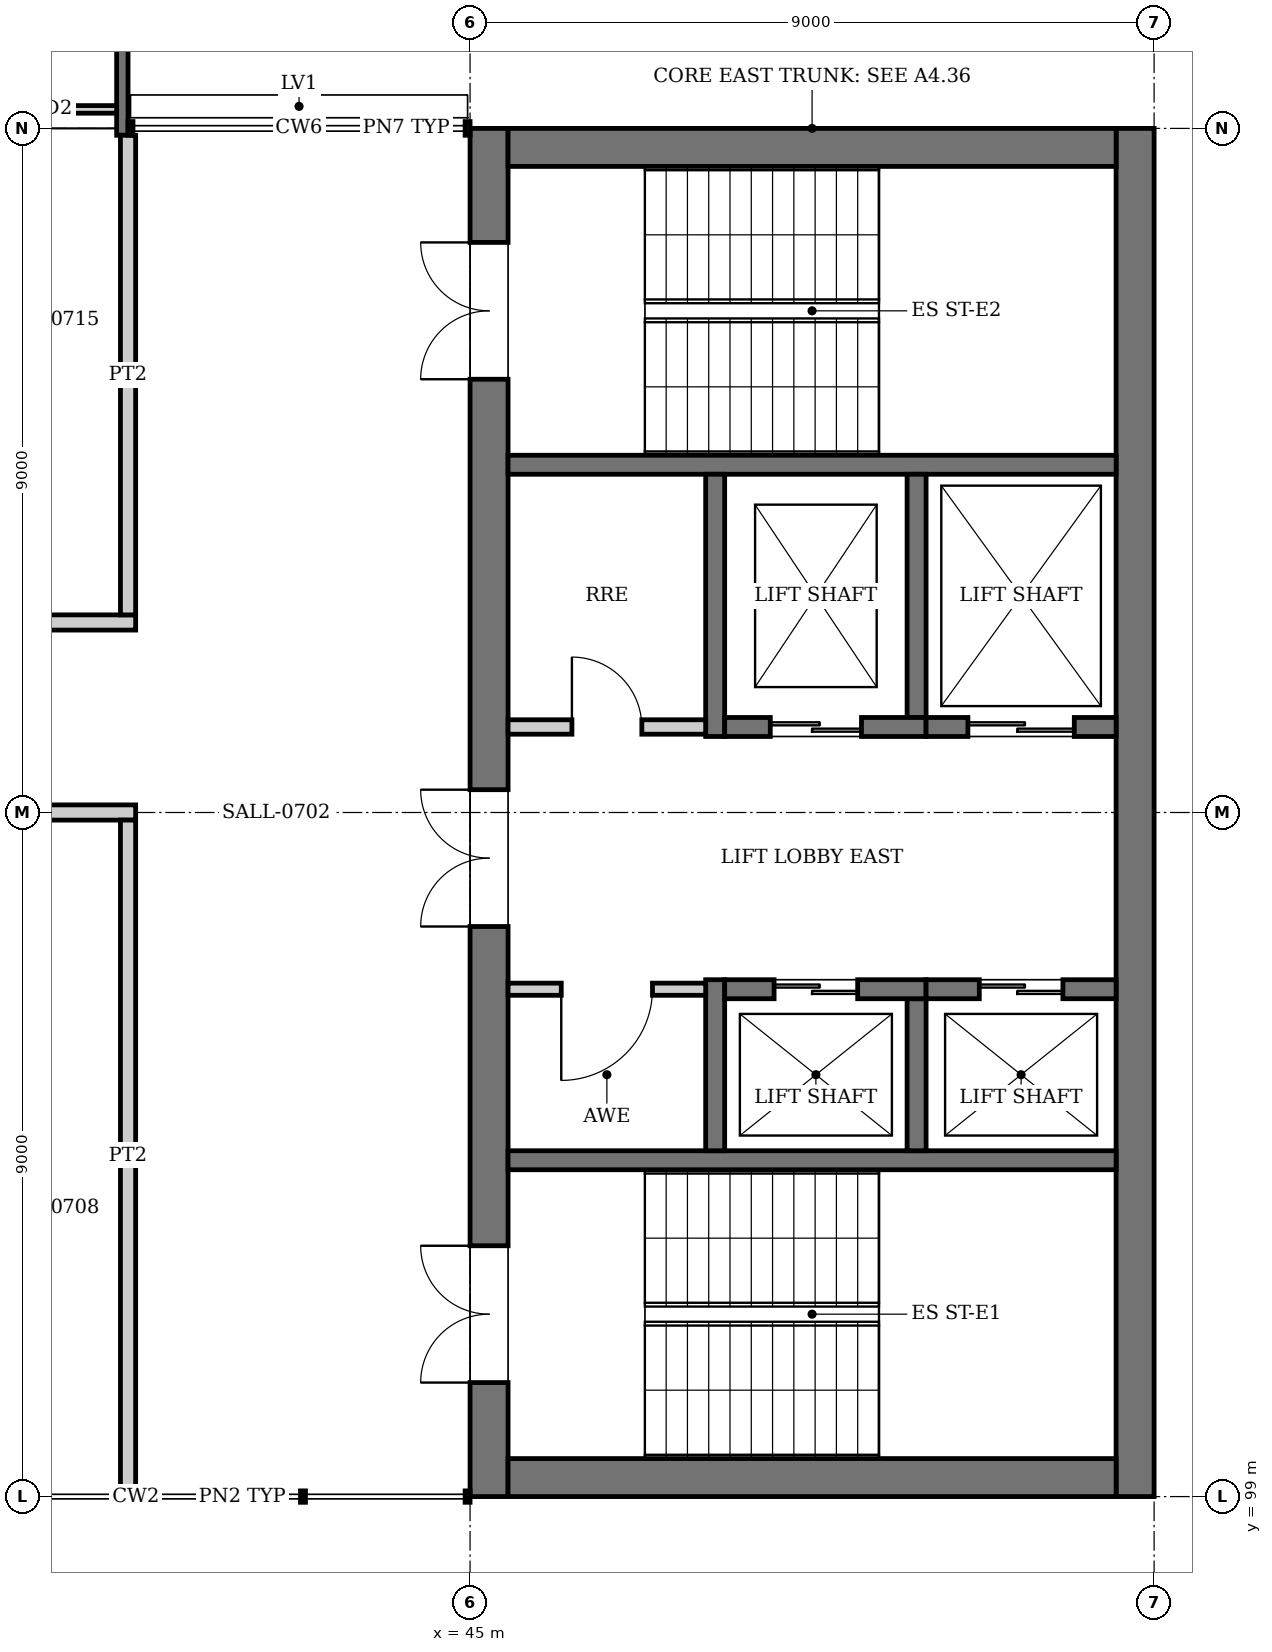
"""IFC4 building model, lengths in metres.
Left out: names, types, materials, properties, quantities, classifications, styles, units other than length and angle.
Written with IfcOpenShell. Run it as: python <this file> out.ifc"""

import sys

from ifc_helpers import new_model, si_unit, direction, frame, frame_2d, origin, place, context, subcontext, project, spatial, rectangle, extrude, element, fill, save


model = new_model("IFC4")
c1 = context("Model", 3, precision=1e-05, world=origin(), true_north=direction((0.0, 1.0)))
c2 = subcontext(c1, "Body", "Model", "MODEL_VIEW")
j1 = project(units=[si_unit("LENGTHUNIT", "METRE"), si_unit("PLANEANGLEUNIT", "RADIAN")], contexts=[c1])
p1 = place(None, origin())
s1 = spatial("IfcSite", under=j1, at=p1, CompositionType="ELEMENT")
p2 = place(p1, origin())
s2 = spatial("IfcBuilding", under=s1, at=p2, CompositionType="ELEMENT")
p3 = place(p2, frame((0.0, 0.0, 31.2)))
s3 = spatial("IfcBuildingStorey", under=s2, at=p3, CompositionType="ELEMENT", Elevation=31.2)
p4 = place(p3, frame((45.25, 99.0, 0.0), z_axis=(0.0, 0.0, 1.0), x_axis=(0.0, 1.0, 0.0)))
e1 = element("IfcWall", 1, at=p4, inside=s3, PredefinedType="SHEAR", context=c2, shape_type="SweptSolid", body=[
    extrude(rectangle(XDim=18.0, YDim=0.5, at=frame_2d((9.0, 0.0))), origin(), (0.0, 0.0, 1.0), 4.0),
])
p5 = place(p4, frame((1.5, 0.0, 0.0)))
e2 = element("IfcOpeningElement", 2, at=p5, cuts=e1, PredefinedType="OPENING", context=c2, shape_type="SweptSolid", body=[
    extrude(rectangle(XDim=1.8, YDim=2.1, at=frame_2d((0.9, 1.05))), frame((0.0, 0.26, 0.0), z_axis=(0.0, -1.0, 0.0), x_axis=(1.0, 0.0, 0.0)), (0.0, 0.0, 1.0), 0.52),
])
p6 = place(p4, frame((14.7, 0.0, 0.0)))
e3 = element("IfcOpeningElement", 3, at=p6, cuts=e1, PredefinedType="OPENING", context=c2, shape_type="SweptSolid", body=[
    extrude(rectangle(XDim=1.8, YDim=2.1, at=frame_2d((0.9, 1.05))), frame((0.0, 0.26, 0.0), z_axis=(0.0, -1.0, 0.0), x_axis=(1.0, 0.0, 0.0)), (0.0, 0.0, 1.0), 0.52),
])
p7 = place(p4, frame((7.5, 0.0, 0.0)))
e4 = element("IfcOpeningElement", 4, at=p7, cuts=e1, PredefinedType="OPENING", context=c2, shape_type="SweptSolid", body=[
    extrude(rectangle(XDim=1.8, YDim=2.1, at=frame_2d((0.9, 1.05))), frame((0.0, 0.26, 0.0), z_axis=(0.0, -1.0, 0.0), x_axis=(1.0, 0.0, 0.0)), (0.0, 0.0, 1.0), 0.52),
])
p8 = place(p3, frame((53.75, 99.0, 0.0), z_axis=(0.0, 0.0, 1.0), x_axis=(0.0, 1.0, 0.0)))
e5 = element("IfcWall", 5, at=p8, inside=s3, PredefinedType="SHEAR", context=c2, shape_type="SweptSolid", body=[
    extrude(rectangle(XDim=18.0, YDim=0.5, at=frame_2d((9.0, 0.0))), origin(), (0.0, 0.0, 1.0), 4.0),
])
for number, where, z_axis, x_axis in (
    (6, (45.5, 99.25, 0.0), (0.0, 0.0, 1.0), (1.0, 0.0, 0.0)),
    (7, (45.5, 116.75, 0.0), (0.0, 0.0, 1.0), (1.0, 0.0, 0.0)),
):
    element("IfcWall", number, at=place(p3, frame(where, z_axis=z_axis, x_axis=x_axis)), inside=s3, PredefinedType="SHEAR", context=c2, shape_type="SweptSolid", body=[
        extrude(rectangle(XDim=8.0, YDim=0.5, at=frame_2d((4.0, 0.0))), origin(), (0.0, 0.0, 1.0), 4.0),
    ])
p9 = place(p3, frame((40.425, 120.45, -0.15), z_axis=(0.0, 0.0, 1.0), x_axis=(0.0, -1.0, 0.0)))
e8 = element("IfcWall", 8, at=p9, inside=s3, PredefinedType="SOLIDWALL", context=c2, shape_type="SweptSolid", body=[
    extrude(rectangle(XDim=3.54, YDim=0.15, at=frame_2d((1.77, 0.0))), origin(), (0.0, 0.0, 1.0), 2.75),
])
p10 = place(p3, frame((36.15, 117.25, 0.0), z_axis=(0.0, 0.0, 1.0), x_axis=(1.0, 0.0, 0.0)))
e9 = element("IfcWall", 9, at=p10, inside=s3, PredefinedType="PARTITIONING", context=c2, shape_type="SweptSolid", body=[
    extrude(rectangle(XDim=4.2, YDim=0.1, at=frame_2d((2.1, 0.0))), origin(), (0.0, 0.0, 1.0), 2.6),
])
p11 = place(p10, frame((1.6, 0.0, 0.0)))
e10 = element("IfcOpeningElement", 10, at=p11, cuts=e9, PredefinedType="OPENING", context=c2, shape_type="SweptSolid", body=[
    extrude(rectangle(XDim=0.9, YDim=2.1, at=frame_2d((0.45, 1.05))), frame((0.0, 0.06, 0.0), z_axis=(0.0, -1.0, 0.0), x_axis=(1.0, 0.0, 0.0)), (0.0, 0.0, 1.0), 0.12),
])
for number, where, z_axis, x_axis in (
    (11, (45.5, 103.425, 0.0), (0.0, 0.0, 1.0), (1.0, 0.0, 0.0)),
    (12, (45.5, 112.575, 0.0), (0.0, 0.0, 1.0), (1.0, 0.0, 0.0)),
):
    element("IfcWall", number, at=place(p3, frame(where, z_axis=z_axis, x_axis=x_axis)), inside=s3, PredefinedType="SOLIDWALL", context=c2, shape_type="SweptSolid", body=[
        extrude(rectangle(XDim=8.0, YDim=0.25, at=frame_2d((4.0, 0.0))), origin(), (0.0, 0.0, 1.0), 3.75),
    ])
p12 = place(p3, frame((48.225, 103.55, 0.0), z_axis=(0.0, 0.0, 1.0), x_axis=(0.0, 1.0, 0.0)))
e13 = element("IfcWall", 13, at=p12, inside=s3, PredefinedType="SOLIDWALL", context=c2, shape_type="SweptSolid", body=[
    extrude(rectangle(XDim=2.25, YDim=0.25, at=frame_2d((1.125, 0.0))), origin(), (0.0, 0.0, 1.0), 4.0),
])
p13 = place(p3, frame((50.875, 103.55, 0.0), z_axis=(0.0, 0.0, 1.0), x_axis=(0.0, 1.0, 0.0)))
e14 = element("IfcWall", 14, at=p13, inside=s3, PredefinedType="SOLIDWALL", context=c2, shape_type="SweptSolid", body=[
    extrude(rectangle(XDim=2.0, YDim=0.25, at=frame_2d((1.0, 0.0))), origin(), (0.0, 0.0, 1.0), 4.0),
])
p14 = place(p3, frame((48.35, 105.675, 0.0), z_axis=(0.0, 0.0, 1.0), x_axis=(1.0, 0.0, 0.0)))
e15 = element("IfcWall", 15, at=p14, inside=s3, PredefinedType="SOLIDWALL", context=c2, shape_type="SweptSolid", body=[
    extrude(rectangle(XDim=2.65, YDim=0.25, at=frame_2d((1.325, 0.0))), origin(), (0.0, 0.0, 1.0), 4.0),
])
p15 = place(p14, frame((0.65, 0.0, 0.0)))
e16 = element("IfcOpeningElement", 16, at=p15, cuts=e15, PredefinedType="OPENING", context=c2, shape_type="SweptSolid", body=[
    extrude(rectangle(XDim=1.1, YDim=2.1, at=frame_2d((0.55, 1.05))), frame((0.0, 0.135, 0.0), z_axis=(0.0, -1.0, 0.0), x_axis=(1.0, 0.0, 0.0)), (0.0, 0.0, 1.0), 0.27),
])
p16 = place(p3, frame((51.0, 105.675, 0.0), z_axis=(0.0, 0.0, 1.0), x_axis=(1.0, 0.0, 0.0)))
e17 = element("IfcWall", 17, at=p16, inside=s3, PredefinedType="SOLIDWALL", context=c2, shape_type="SweptSolid", body=[
    extrude(rectangle(XDim=2.5, YDim=0.25, at=frame_2d((1.25, 0.0))), origin(), (0.0, 0.0, 1.0), 4.0),
])
p17 = place(p16, frame((0.7, 0.0, 0.0)))
e18 = element("IfcOpeningElement", 18, at=p17, cuts=e17, PredefinedType="OPENING", context=c2, shape_type="SweptSolid", body=[
    extrude(rectangle(XDim=1.1, YDim=2.1, at=frame_2d((0.55, 1.05))), frame((0.0, 0.135, 0.0), z_axis=(0.0, -1.0, 0.0), x_axis=(1.0, 0.0, 0.0)), (0.0, 0.0, 1.0), 0.27),
])
p18 = place(p3, frame((48.225, 109.0, 0.0), z_axis=(0.0, 0.0, 1.0), x_axis=(0.0, 1.0, 0.0)))
e19 = element("IfcWall", 19, at=p18, inside=s3, PredefinedType="SOLIDWALL", context=c2, shape_type="SweptSolid", body=[
    extrude(rectangle(XDim=3.45, YDim=0.25, at=frame_2d((1.725, 0.0))), origin(), (0.0, 0.0, 1.0), 4.0),
])
p19 = place(p3, frame((50.875, 109.25, 0.0), z_axis=(0.0, 0.0, 1.0), x_axis=(0.0, 1.0, 0.0)))
e20 = element("IfcWall", 20, at=p19, inside=s3, PredefinedType="SOLIDWALL", context=c2, shape_type="SweptSolid", body=[
    extrude(rectangle(XDim=3.2, YDim=0.25, at=frame_2d((1.6, 0.0))), origin(), (0.0, 0.0, 1.0), 4.0),
])
p20 = place(p3, frame((48.35, 109.125, 0.0), z_axis=(0.0, 0.0, 1.0), x_axis=(1.0, 0.0, 0.0)))
e21 = element("IfcWall", 21, at=p20, inside=s3, PredefinedType="SOLIDWALL", context=c2, shape_type="SweptSolid", body=[
    extrude(rectangle(XDim=2.65, YDim=0.25, at=frame_2d((1.325, 0.0))), origin(), (0.0, 0.0, 1.0), 4.0),
])
p21 = place(p20, frame((0.6, 0.0, 0.0)))
e22 = element("IfcOpeningElement", 22, at=p21, cuts=e21, PredefinedType="OPENING", context=c2, shape_type="SweptSolid", body=[
    extrude(rectangle(XDim=1.2, YDim=2.1, at=frame_2d((0.6, 1.05))), frame((0.0, 0.135, 0.0), z_axis=(0.0, -1.0, 0.0), x_axis=(1.0, 0.0, 0.0)), (0.0, 0.0, 1.0), 0.27),
])
p22 = place(p3, frame((51.0, 109.125, 0.0), z_axis=(0.0, 0.0, 1.0), x_axis=(1.0, 0.0, 0.0)))
e23 = element("IfcWall", 23, at=p22, inside=s3, PredefinedType="SOLIDWALL", context=c2, shape_type="SweptSolid", body=[
    extrude(rectangle(XDim=2.5, YDim=0.25, at=frame_2d((1.25, 0.0))), origin(), (0.0, 0.0, 1.0), 4.0),
])
p23 = place(p22, frame((0.55, 0.0, 0.0)))
e24 = element("IfcOpeningElement", 24, at=p23, cuts=e23, PredefinedType="OPENING", context=c2, shape_type="SweptSolid", body=[
    extrude(rectangle(XDim=1.4, YDim=2.4, at=frame_2d((0.7, 1.2))), frame((0.0, 0.135, 0.0), z_axis=(0.0, -1.0, 0.0), x_axis=(1.0, 0.0, 0.0)), (0.0, 0.0, 1.0), 0.27),
])
p24 = place(p3, frame((45.5, 105.675, 0.0), z_axis=(0.0, 0.0, 1.0), x_axis=(1.0, 0.0, 0.0)))
e25 = element("IfcWall", 25, at=p24, inside=s3, PredefinedType="PARTITIONING", context=c2, shape_type="SweptSolid", body=[
    extrude(rectangle(XDim=2.6, YDim=0.16, at=frame_2d((1.3, 0.0))), origin(), (0.0, 0.0, 1.0), 3.75),
])
p25 = place(p24, frame((0.7, 0.0, 0.0)))
e26 = element("IfcOpeningElement", 26, at=p25, cuts=e25, PredefinedType="OPENING", context=c2, shape_type="SweptSolid", body=[
    extrude(rectangle(XDim=1.2, YDim=2.1, at=frame_2d((0.6, 1.05))), frame((0.0, 0.09, 0.0), z_axis=(0.0, -1.0, 0.0), x_axis=(1.0, 0.0, 0.0)), (0.0, 0.0, 1.0), 0.18),
])
p26 = place(p3, frame((45.5, 109.125, 0.0), z_axis=(0.0, 0.0, 1.0), x_axis=(1.0, 0.0, 0.0)))
e27 = element("IfcWall", 27, at=p26, inside=s3, PredefinedType="PARTITIONING", context=c2, shape_type="SweptSolid", body=[
    extrude(rectangle(XDim=2.6, YDim=0.19, at=frame_2d((1.3, 0.0))), origin(), (0.0, 0.0, 1.0), 3.75),
])
p27 = place(p26, frame((0.84, 0.0, 0.0)))
e28 = element("IfcOpeningElement", 28, at=p27, cuts=e27, PredefinedType="OPENING", context=c2, shape_type="SweptSolid", body=[
    extrude(rectangle(XDim=0.92, YDim=2.1, at=frame_2d((0.46, 1.05))), frame((0.0, 0.105, 0.0), z_axis=(0.0, -1.0, 0.0), x_axis=(1.0, 0.0, 0.0)), (0.0, 0.0, 1.0), 0.21),
])
p28 = place(p3, frame((18.08, 108.0, 0.0), z_axis=(0.0, 0.0, 1.0), x_axis=(1.0, 0.0, 0.0)))
e29 = element("IfcWall", 29, at=p28, inside=s3, PredefinedType="PARTITIONING", context=c2, shape_type="SweptSolid", body=[
    extrude(rectangle(XDim=22.52, YDim=0.2, at=frame_2d((11.26, 0.0))), origin(), (0.0, 0.0, 1.0), 3.05),
])
p29 = place(p28, frame((5.77, 0.0, 0.0)))
e30 = element("IfcOpeningElement", 30, at=p29, cuts=e29, PredefinedType="OPENING", context=c2, shape_type="SweptSolid", body=[
    extrude(rectangle(XDim=1.8, YDim=2.1, at=frame_2d((0.9, 1.05))), frame((0.0, 0.11, 0.0), z_axis=(0.0, -1.0, 0.0), x_axis=(1.0, 0.0, 0.0)), (0.0, 0.0, 1.0), 0.22),
])
p30 = place(p28, frame((15.17, 0.0, 0.0)))
e31 = element("IfcOpeningElement", 31, at=p30, cuts=e29, PredefinedType="OPENING", context=c2, shape_type="SweptSolid", body=[
    extrude(rectangle(XDim=1.0, YDim=2.1, at=frame_2d((0.5, 1.05))), frame((0.0, 0.11, 0.0), z_axis=(0.0, -1.0, 0.0), x_axis=(1.0, 0.0, 0.0)), (0.0, 0.0, 1.0), 0.22),
])
p31 = place(p28, frame((19.67, 0.0, 0.0)))
e32 = element("IfcOpeningElement", 32, at=p31, cuts=e29, PredefinedType="OPENING", context=c2, shape_type="SweptSolid", body=[
    extrude(rectangle(XDim=1.0, YDim=2.1, at=frame_2d((0.5, 1.05))), frame((0.0, 0.11, 0.0), z_axis=(0.0, -1.0, 0.0), x_axis=(1.0, 0.0, 0.0)), (0.0, 0.0, 1.0), 0.22),
])
p32 = place(p3, frame((13.4, 110.5, 0.0), z_axis=(0.0, 0.0, 1.0), x_axis=(1.0, 0.0, 0.0)))
e33 = element("IfcWall", 33, at=p32, inside=s3, PredefinedType="PARTITIONING", context=c2, shape_type="SweptSolid", body=[
    extrude(rectangle(XDim=27.2, YDim=0.2, at=frame_2d((13.6, 0.0))), origin(), (0.0, 0.0, 1.0), 3.05),
])
p33 = place(p32, frame((6.35, 0.0, 0.0)))
e34 = element("IfcOpeningElement", 34, at=p33, cuts=e33, PredefinedType="OPENING", context=c2, shape_type="SweptSolid", body=[
    extrude(rectangle(XDim=1.0, YDim=2.1, at=frame_2d((0.5, 1.05))), frame((0.0, 0.11, 0.0), z_axis=(0.0, -1.0, 0.0), x_axis=(1.0, 0.0, 0.0)), (0.0, 0.0, 1.0), 0.22),
])
p34 = place(p32, frame((10.85, 0.0, 0.0)))
e35 = element("IfcOpeningElement", 35, at=p34, cuts=e33, PredefinedType="OPENING", context=c2, shape_type="SweptSolid", body=[
    extrude(rectangle(XDim=1.0, YDim=2.1, at=frame_2d((0.5, 1.05))), frame((0.0, 0.11, 0.0), z_axis=(0.0, -1.0, 0.0), x_axis=(1.0, 0.0, 0.0)), (0.0, 0.0, 1.0), 0.22),
])
p35 = place(p32, frame((15.35, 0.0, 0.0)))
e36 = element("IfcOpeningElement", 36, at=p35, cuts=e33, PredefinedType="OPENING", context=c2, shape_type="SweptSolid", body=[
    extrude(rectangle(XDim=1.0, YDim=2.1, at=frame_2d((0.5, 1.05))), frame((0.0, 0.11, 0.0), z_axis=(0.0, -1.0, 0.0), x_axis=(1.0, 0.0, 0.0)), (0.0, 0.0, 1.0), 0.22),
])
p36 = place(p32, frame((19.85, 0.0, 0.0)))
e37 = element("IfcOpeningElement", 37, at=p36, cuts=e33, PredefinedType="OPENING", context=c2, shape_type="SweptSolid", body=[
    extrude(rectangle(XDim=1.0, YDim=2.1, at=frame_2d((0.5, 1.05))), frame((0.0, 0.11, 0.0), z_axis=(0.0, -1.0, 0.0), x_axis=(1.0, 0.0, 0.0)), (0.0, 0.0, 1.0), 0.22),
])
p37 = place(p32, frame((24.35, 0.0, 0.0)))
e38 = element("IfcOpeningElement", 38, at=p37, cuts=e33, PredefinedType="OPENING", context=c2, shape_type="SweptSolid", body=[
    extrude(rectangle(XDim=1.0, YDim=2.1, at=frame_2d((0.5, 1.05))), frame((0.0, 0.11, 0.0), z_axis=(0.0, -1.0, 0.0), x_axis=(1.0, 0.0, 0.0)), (0.0, 0.0, 1.0), 0.22),
])
p38 = place(p3, frame((40.5, 99.075, 0.0), z_axis=(0.0, 0.0, 1.0), x_axis=(0.0, 1.0, 0.0)))
e39 = element("IfcWall", 39, at=p38, inside=s3, PredefinedType="PARTITIONING", context=c2, shape_type="SweptSolid", body=[
    extrude(rectangle(XDim=8.825, YDim=0.2, at=frame_2d((4.413, 0.0))), origin(), (0.0, 0.0, 1.0), 3.05),
])
p39 = place(p3, frame((40.5, 110.6, 0.0), z_axis=(0.0, 0.0, 1.0), x_axis=(0.0, 1.0, 0.0)))
e40 = element("IfcWall", 40, at=p39, inside=s3, PredefinedType="PARTITIONING", context=c2, shape_type="SweptSolid", body=[
    extrude(rectangle(XDim=6.31, YDim=0.2, at=frame_2d((3.155, 0.0))), origin(), (0.0, 0.0, 1.0), 3.05),
])
p40 = place(p15, origin())
e41 = element("IfcDoor", 41, at=p40, inside=s3, OperationType="DOUBLE_DOOR_SLIDING", PredefinedType="DOOR", context=c2, shape_type="SweptSolid", body=[
    extrude(rectangle(XDim=1.1, YDim=2.1, at=frame_2d((0.55, 1.05))), frame((0.0, 0.025, 0.0), z_axis=(0.0, -1.0, 0.0), x_axis=(1.0, 0.0, 0.0)), (0.0, 0.0, 1.0), 0.05),
])
fill(e16, e41)
p41 = place(p17, origin())
e42 = element("IfcDoor", 42, at=p41, inside=s3, OperationType="DOUBLE_DOOR_SLIDING", PredefinedType="DOOR", context=c2, shape_type="SweptSolid", body=[
    extrude(rectangle(XDim=1.1, YDim=2.1, at=frame_2d((0.55, 1.05))), frame((0.0, 0.025, 0.0), z_axis=(0.0, -1.0, 0.0), x_axis=(1.0, 0.0, 0.0)), (0.0, 0.0, 1.0), 0.05),
])
fill(e18, e42)
p42 = place(p21, origin())
e43 = element("IfcDoor", 43, at=p42, inside=s3, OperationType="DOUBLE_DOOR_SLIDING", PredefinedType="DOOR", context=c2, shape_type="SweptSolid", body=[
    extrude(rectangle(XDim=1.2, YDim=2.1, at=frame_2d((0.6, 1.05))), frame((0.0, 0.025, 0.0), z_axis=(0.0, -1.0, 0.0), x_axis=(1.0, 0.0, 0.0)), (0.0, 0.0, 1.0), 0.05),
])
fill(e22, e43)
p43 = place(p23, origin())
e44 = element("IfcDoor", 44, at=p43, inside=s3, OperationType="DOUBLE_DOOR_SLIDING", PredefinedType="DOOR", context=c2, shape_type="SweptSolid", body=[
    extrude(rectangle(XDim=1.4, YDim=2.4, at=frame_2d((0.7, 1.2))), frame((0.0, 0.025, 0.0), z_axis=(0.0, -1.0, 0.0), x_axis=(1.0, 0.0, 0.0)), (0.0, 0.0, 1.0), 0.05),
])
fill(e24, e44)
p44 = place(p5, origin())
e45 = element("IfcDoor", 45, at=p44, inside=s3, OperationType="DOUBLE_DOOR_SINGLE_SWING", PredefinedType="DOOR", context=c2, shape_type="SweptSolid", body=[
    extrude(rectangle(XDim=1.8, YDim=2.1, at=frame_2d((0.9, 1.05))), frame((0.0, 0.025, 0.0), z_axis=(0.0, -1.0, 0.0), x_axis=(1.0, 0.0, 0.0)), (0.0, 0.0, 1.0), 0.05),
])
fill(e2, e45)
p45 = place(p6, origin())
e46 = element("IfcDoor", 46, at=p45, inside=s3, OperationType="DOUBLE_DOOR_SINGLE_SWING", PredefinedType="DOOR", context=c2, shape_type="SweptSolid", body=[
    extrude(rectangle(XDim=1.8, YDim=2.1, at=frame_2d((0.9, 1.05))), frame((0.0, 0.025, 0.0), z_axis=(0.0, -1.0, 0.0), x_axis=(1.0, 0.0, 0.0)), (0.0, 0.0, 1.0), 0.05),
])
fill(e3, e46)
p46 = place(p7, origin())
e47 = element("IfcDoor", 47, at=p46, inside=s3, OperationType="DOUBLE_DOOR_SINGLE_SWING", PredefinedType="DOOR", context=c2, shape_type="SweptSolid", body=[
    extrude(rectangle(XDim=1.8, YDim=2.1, at=frame_2d((0.9, 1.05))), frame((0.0, 0.025, 0.0), z_axis=(0.0, -1.0, 0.0), x_axis=(1.0, 0.0, 0.0)), (0.0, 0.0, 1.0), 0.05),
])
fill(e4, e47)
p47 = place(p25, frame((1.2, 0.0, 0.0), z_axis=(0.0, 0.0, 1.0), x_axis=(-1.0, 0.0, 0.0)))
e48 = element("IfcDoor", 48, at=p47, inside=s3, OperationType="SINGLE_SWING_RIGHT", PredefinedType="DOOR", context=c2, shape_type="SweptSolid", body=[
    extrude(rectangle(XDim=1.2, YDim=2.1, at=frame_2d((0.6, 1.05))), frame((0.0, 0.025, 0.0), z_axis=(0.0, -1.0, 0.0), x_axis=(1.0, 0.0, 0.0)), (0.0, 0.0, 1.0), 0.05),
])
fill(e26, e48)
p48 = place(p27, origin())
e49 = element("IfcDoor", 49, at=p48, inside=s3, OperationType="SINGLE_SWING_LEFT", PredefinedType="DOOR", context=c2, shape_type="SweptSolid", body=[
    extrude(rectangle(XDim=0.92, YDim=2.1, at=frame_2d((0.46, 1.05))), frame((0.0, 0.025, 0.0), z_axis=(0.0, -1.0, 0.0), x_axis=(1.0, 0.0, 0.0)), (0.0, 0.0, 1.0), 0.05),
])
fill(e28, e49)
save(model, sys.argv[1])
